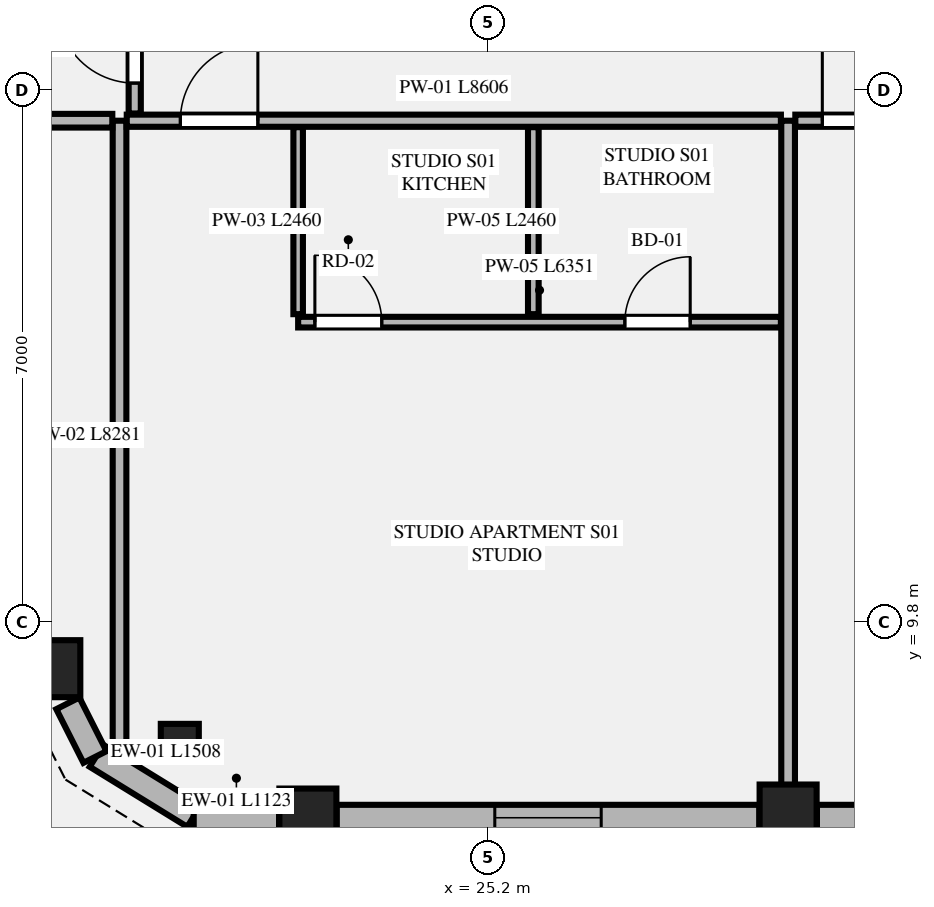
"""IFC4 building model, lengths in metres.
Left out: names, types, materials, properties, quantities, classifications, styles, units other than length and angle.
Written with IfcOpenShell. Run it as: python <this file> out.ifc"""

import sys

from ifc_helpers import new_model, si_unit, direction, frame, frame_2d, origin, origin_2d, place, context, subcontext, project, spatial, rectangle, extrude, element, fill, save


model = new_model("IFC4")
c1 = context("Model", 3, precision=1e-05, world=origin(), true_north=direction((0.0, 1.0)))
c2 = subcontext(c1, "Body", "Model", "MODEL_VIEW")
j1 = project(units=[si_unit("LENGTHUNIT", "METRE"), si_unit("PLANEANGLEUNIT", "RADIAN")], contexts=[c1])
p1 = place(None, origin())
s1 = spatial("IfcSite", under=j1, at=p1, CompositionType="ELEMENT")
p2 = place(p1, origin())
s2 = spatial("IfcBuilding", under=s1, at=p2, CompositionType="ELEMENT")
p3 = place(p2, frame((0.0, 0.0, 227.0)))
s3 = spatial("IfcBuildingStorey", under=s2, at=p3, CompositionType="ELEMENT", Elevation=227.0)
for number, where, z_axis, x_axis in (
    (1, (22.828, 7.239, 0.0), (0.0, 0.0, 1.0), (1.0, 0.0, 0.0)),
    (2, (29.146, 7.292, 0.0), (0.0, 0.0, 1.0), (1.0, 0.0, 0.0)),
    (3, (19.459, 9.191, 0.0), (0.0, 0.0, 1.0), (1.0, 0.0, 0.0)),
):
    element("IfcColumn", number, at=place(p3, frame(where, z_axis=z_axis, x_axis=x_axis)), inside=s3, PredefinedType="COLUMN", context=c2, shape_type="SweptSolid", body=[
        extrude(rectangle(XDim=0.75, YDim=0.75, at=origin_2d()), origin(), (0.0, 0.0, 1.0), 3.65),
    ])
p4 = place(p3, frame((21.143, 8.215, 0.0), z_axis=(0.0, 0.0, 1.0), x_axis=(0.865256437757, -0.501329529272, 0.0)))
e4 = element("IfcColumn", 4, at=p4, inside=s3, PredefinedType="PILASTER", context=c2, shape_type="SweptSolid", body=[
    extrude(rectangle(XDim=0.5, YDim=0.35, at=origin_2d()), origin(), (0.0, 0.0, 1.0), 3.65),
])
p5 = place(p3, frame((20.047, 8.045, 0.0), z_axis=(0.0, 0.0, 1.0), x_axis=(0.851680557619, -0.52406128246, 0.0)))
e5 = element("IfcWall", 5, at=p5, inside=s3, PredefinedType="STANDARD", context=c2, shape_type="SweptSolid", body=[
    extrude(rectangle(XDim=1.508, YDim=0.34, at=frame_2d((0.754, 0.0))), origin(), (0.0, 0.0, 1.0), 3.45),
])
p6 = place(p3, frame((21.326, 7.23, 0.0), z_axis=(0.0, 0.0, 1.0), x_axis=(1.0, 0.0, 0.0)))
e6 = element("IfcWall", 6, at=p6, inside=s3, PredefinedType="STANDARD", context=c2, shape_type="SweptSolid", body=[
    extrude(rectangle(XDim=1.123, YDim=0.34, at=frame_2d((0.562, 0.0))), origin(), (0.0, 0.0, 1.0), 3.45),
])
p7 = place(p3, frame((23.207, 7.23, 0.0), z_axis=(0.0, 0.0, 1.0), x_axis=(1.0, 0.0, 0.0)))
e7 = element("IfcWall", 7, at=p7, inside=s3, PredefinedType="STANDARD", context=c2, shape_type="SweptSolid", body=[
    extrude(rectangle(XDim=5.56, YDim=0.34, at=frame_2d((2.78, 0.0))), origin(), (0.0, 0.0, 1.0), 2.983),
])
p8 = place(p7, frame((2.08, 0.0, 0.75)))
e8 = element("IfcOpeningElement", 8, at=p8, cuts=e7, PredefinedType="OPENING", context=c2, shape_type="SweptSolid", body=[
    extrude(rectangle(XDim=1.4, YDim=2.05, at=frame_2d((0.7, 1.025))), frame((0.0, 0.18, 0.0), z_axis=(0.0, -1.0, 0.0), x_axis=(1.0, 0.0, 0.0)), (0.0, 0.0, 1.0), 0.36),
])
p9 = place(p3, frame((29.525, 7.23, 0.0), z_axis=(0.0, 0.0, 1.0), x_axis=(1.0, 0.0, 0.0)))
e9 = element("IfcWall", 9, at=p9, inside=s3, PredefinedType="STANDARD", context=c2, shape_type="SweptSolid", body=[
    extrude(rectangle(XDim=5.75, YDim=0.34, at=frame_2d((2.875, 0.0))), origin(), (0.0, 0.0, 1.0), 2.983),
])
p10 = place(p9, frame((2.125, 0.0, 0.0)))
e10 = element("IfcOpeningElement", 10, at=p10, cuts=e9, PredefinedType="OPENING", context=c2, shape_type="SweptSolid", body=[
    extrude(rectangle(XDim=1.5, YDim=2.3, at=frame_2d((0.75, 1.15))), frame((0.0, 0.18, 0.0), z_axis=(0.0, -1.0, 0.0), x_axis=(1.0, 0.0, 0.0)), (0.0, 0.0, 1.0), 0.36),
])
p11 = place(p3, frame((19.67, 8.735, 0.0), z_axis=(0.0, 0.0, 1.0), x_axis=(0.451404919072, -0.89231922485, 0.0)))
e11 = element("IfcWall", 11, at=p11, inside=s3, PredefinedType="STANDARD", context=c2, shape_type="SweptSolid", body=[
    extrude(rectangle(XDim=0.791, YDim=0.34, at=frame_2d((0.396, 0.0))), origin(), (0.0, 0.0, 1.0), 3.45),
])
p12 = place(p3, frame((20.35, 8.119, 0.0), z_axis=(0.0, 0.0, 1.0), x_axis=(0.0, 1.0, 0.0)))
e12 = element("IfcWall", 12, at=p12, inside=s3, PredefinedType="PARTITIONING", context=c2, shape_type="SweptSolid", body=[
    extrude(rectangle(XDim=8.281, YDim=0.18, at=frame_2d((4.141, 0.0))), origin(), (0.0, 0.0, 1.0), 3.45),
])
p13 = place(p3, frame((29.146, 7.405, 0.0), z_axis=(0.0, 0.0, 1.0), x_axis=(0.0, 1.0, 0.0)))
e13 = element("IfcWall", 13, at=p13, inside=s3, PredefinedType="PARTITIONING", context=c2, shape_type="SweptSolid", body=[
    extrude(rectangle(XDim=8.995, YDim=0.18, at=frame_2d((4.498, 0.0))), origin(), (0.0, 0.0, 1.0), 2.907),
])
p14 = place(p3, frame((20.445, 16.4, 0.0), z_axis=(0.0, 0.0, 1.0), x_axis=(1.0, 0.0, 0.0)))
e14 = element("IfcWall", 14, at=p14, inside=s3, PredefinedType="PARTITIONING", context=c2, shape_type="SweptSolid", body=[
    extrude(rectangle(XDim=8.606, YDim=0.16, at=frame_2d((4.303, 0.0))), origin(), (0.0, 0.0, 1.0), 3.45),
])
p15 = place(p14, frame((0.705, 0.0, 0.0)))
e15 = element("IfcOpeningElement", 15, at=p15, cuts=e14, PredefinedType="OPENING", context=c2, shape_type="SweptSolid", body=[
    extrude(rectangle(XDim=1.02, YDim=2.25, at=frame_2d((0.51, 1.125))), frame((0.0, 0.09, 0.0), z_axis=(0.0, -1.0, 0.0), x_axis=(1.0, 0.0, 0.0)), (0.0, 0.0, 1.0), 0.18),
])
p16 = place(p3, frame((22.7, 13.855, 0.0), z_axis=(0.0, 0.0, 1.0), x_axis=(0.0, 1.0, 0.0)))
e16 = element("IfcWall", 16, at=p16, inside=s3, PredefinedType="PARTITIONING", context=c2, shape_type="SweptSolid", body=[
    extrude(rectangle(XDim=2.46, YDim=0.125, at=frame_2d((1.23, 0.0))), origin(), (0.0, 0.0, 1.0), 2.907),
])
p17 = place(p3, frame((22.7, 13.75, 0.0), z_axis=(0.0, 0.0, 1.0), x_axis=(1.0, 0.0, 0.0)))
e17 = element("IfcWall", 17, at=p17, inside=s3, PredefinedType="PLUMBINGWALL", context=c2, shape_type="SweptSolid", body=[
    extrude(rectangle(XDim=6.351, YDim=0.14, at=frame_2d((3.176, 0.0))), origin(), (0.0, 0.0, 1.0), 3.45),
])
p18 = place(p17, frame((4.298, 0.0, 0.0)))
e18 = element("IfcOpeningElement", 18, at=p18, cuts=e17, PredefinedType="OPENING", context=c2, shape_type="SweptSolid", body=[
    extrude(rectangle(XDim=0.86, YDim=2.1, at=frame_2d((0.43, 1.05))), frame((0.0, 0.08, 0.0), z_axis=(0.0, -1.0, 0.0), x_axis=(1.0, 0.0, 0.0)), (0.0, 0.0, 1.0), 0.16),
])
p19 = place(p17, frame((0.22, 0.0, 0.0)))
e19 = element("IfcOpeningElement", 19, at=p19, cuts=e17, PredefinedType="OPENING", context=c2, shape_type="SweptSolid", body=[
    extrude(rectangle(XDim=0.88, YDim=2.15, at=frame_2d((0.44, 1.075))), frame((0.0, 0.08, 0.0), z_axis=(0.0, -1.0, 0.0), x_axis=(1.0, 0.0, 0.0)), (0.0, 0.0, 1.0), 0.16),
])
p20 = place(p3, frame((25.794, 13.855, 0.0), z_axis=(0.0, 0.0, 1.0), x_axis=(0.0, 1.0, 0.0)))
e20 = element("IfcWall", 20, at=p20, inside=s3, PredefinedType="PLUMBINGWALL", context=c2, shape_type="SweptSolid", body=[
    extrude(rectangle(XDim=2.46, YDim=0.14, at=frame_2d((1.23, 0.0))), origin(), (0.0, 0.0, 1.0), 3.45),
])
p21 = place(p3, frame((29.241, 16.4, 0.0), z_axis=(0.0, 0.0, 1.0), x_axis=(1.0, 0.0, 0.0)))
e21 = element("IfcWall", 21, at=p21, inside=s3, PredefinedType="PARTITIONING", context=c2, shape_type="SweptSolid", body=[
    extrude(rectangle(XDim=6.318, YDim=0.16, at=frame_2d((3.159, 0.0))), origin(), (0.0, 0.0, 1.0), 3.45),
])
p22 = place(p21, frame((0.355, 0.0, 0.0)))
e22 = element("IfcOpeningElement", 22, at=p22, cuts=e21, PredefinedType="OPENING", context=c2, shape_type="SweptSolid", body=[
    extrude(rectangle(XDim=1.02, YDim=2.25, at=frame_2d((0.51, 1.125))), frame((0.0, 0.09, 0.0), z_axis=(0.0, -1.0, 0.0), x_axis=(1.0, 0.0, 0.0)), (0.0, 0.0, 1.0), 0.18),
])
p23 = place(p3, frame((16.034, 16.4, 0.0), z_axis=(0.0, 0.0, 1.0), x_axis=(1.0, 0.0, 0.0)))
e23 = element("IfcWall", 23, at=p23, inside=s3, PredefinedType="PARTITIONING", context=c2, shape_type="SweptSolid", body=[
    extrude(rectangle(XDim=4.221, YDim=0.18, at=frame_2d((2.11, 0.0))), origin(), (0.0, 0.0, 1.0), 3.45),
])
p24 = place(p3, frame((20.55, 16.495, 0.0), z_axis=(0.0, 0.0, 1.0), x_axis=(0.0, 1.0, 0.0)))
e24 = element("IfcWall", 24, at=p24, inside=s3, PredefinedType="PARTITIONING", context=c2, shape_type="SweptSolid", body=[
    extrude(rectangle(XDim=8.738, YDim=0.16, at=frame_2d((4.369, 0.0))), origin(), (0.0, 0.0, 1.0), 3.137),
])
p25 = place(p24, frame((0.4, 0.0, 0.0)))
e25 = element("IfcOpeningElement", 25, at=p25, cuts=e24, PredefinedType="OPENING", context=c2, shape_type="SweptSolid", body=[
    extrude(rectangle(XDim=1.02, YDim=2.25, at=frame_2d((0.51, 1.125))), frame((0.0, 0.09, 0.0), z_axis=(0.0, -1.0, 0.0), x_axis=(1.0, 0.0, 0.0)), (0.0, 0.0, 1.0), 0.18),
])
p26 = place(p8, origin())
e26 = element("IfcWindow", 26, at=p26, inside=s3, PartitioningType="SINGLE_PANEL", PredefinedType="WINDOW", context=c2, shape_type="SweptSolid", body=[
    extrude(rectangle(XDim=1.4, YDim=2.05, at=frame_2d((0.7, 1.025))), frame((0.0, 0.03, 0.0), z_axis=(0.0, -1.0, 0.0), x_axis=(1.0, 0.0, 0.0)), (0.0, 0.0, 1.0), 0.06),
])
fill(e8, e26)
p27 = place(p18, origin())
e27 = element("IfcDoor", 27, at=p27, inside=s3, OperationType="SINGLE_SWING_RIGHT", PredefinedType="DOOR", context=c2, shape_type="SweptSolid", body=[
    extrude(rectangle(XDim=0.86, YDim=2.1, at=frame_2d((0.43, 1.05))), frame((0.0, 0.025, 0.0), z_axis=(0.0, -1.0, 0.0), x_axis=(1.0, 0.0, 0.0)), (0.0, 0.0, 1.0), 0.05),
])
fill(e18, e27)
p28 = place(p15, origin())
e28 = element("IfcDoor", 28, at=p28, inside=s3, OperationType="SINGLE_SWING_RIGHT", PredefinedType="DOOR", context=c2, shape_type="SweptSolid", body=[
    extrude(rectangle(XDim=1.02, YDim=2.25, at=frame_2d((0.51, 1.125))), frame((0.0, 0.025, 0.0), z_axis=(0.0, -1.0, 0.0), x_axis=(1.0, 0.0, 0.0)), (0.0, 0.0, 1.0), 0.05),
])
fill(e15, e28)
p29 = place(p19, origin())
e29 = element("IfcDoor", 29, at=p29, inside=s3, OperationType="SINGLE_SWING_LEFT", PredefinedType="DOOR", context=c2, shape_type="SweptSolid", body=[
    extrude(rectangle(XDim=0.88, YDim=2.15, at=frame_2d((0.44, 1.075))), frame((0.0, 0.025, 0.0), z_axis=(0.0, -1.0, 0.0), x_axis=(1.0, 0.0, 0.0)), (0.0, 0.0, 1.0), 0.05),
])
fill(e19, e29)
p30 = place(p22, origin())
e30 = element("IfcDoor", 30, at=p30, inside=s3, OperationType="SINGLE_SWING_LEFT", PredefinedType="DOOR", context=c2, shape_type="SweptSolid", body=[
    extrude(rectangle(XDim=1.02, YDim=2.25, at=frame_2d((0.51, 1.125))), frame((0.0, 0.025, 0.0), z_axis=(0.0, -1.0, 0.0), x_axis=(1.0, 0.0, 0.0)), (0.0, 0.0, 1.0), 0.05),
])
fill(e22, e30)
p31 = place(p25, origin())
e31 = element("IfcDoor", 31, at=p31, inside=s3, OperationType="SINGLE_SWING_RIGHT", PredefinedType="DOOR", context=c2, shape_type="SweptSolid", body=[
    extrude(rectangle(XDim=1.02, YDim=2.25, at=frame_2d((0.51, 1.125))), frame((0.0, 0.025, 0.0), z_axis=(0.0, -1.0, 0.0), x_axis=(1.0, 0.0, 0.0)), (0.0, 0.0, 1.0), 0.05),
])
fill(e25, e31)
save(model, sys.argv[1])
